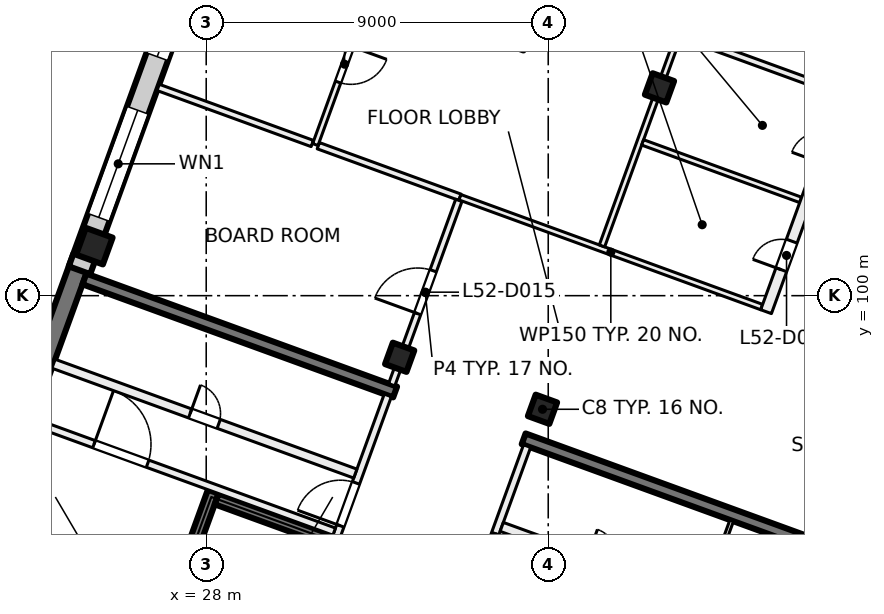
"""IFC4 building model, lengths in metres.
Left out: names, types, materials, properties, quantities, classifications, styles, units other than length and angle.
Written with IfcOpenShell. Run it as: python <this file> out.ifc"""

import sys

from ifc_helpers import new_model, si_unit, direction, frame, frame_2d, origin, origin_2d, place, context, subcontext, project, spatial, rectangle, extrude, element, fill, save


model = new_model("IFC4")
c1 = context("Model", 3, precision=1e-05, world=origin(), true_north=direction((0.0, 1.0)))
c2 = subcontext(c1, "Body", "Model", "MODEL_VIEW")
j1 = project(units=[si_unit("LENGTHUNIT", "METRE"), si_unit("PLANEANGLEUNIT", "RADIAN")], contexts=[c1])
p1 = place(None, origin())
s1 = spatial("IfcSite", under=j1, at=p1, CompositionType="ELEMENT")
p2 = place(p1, origin())
s2 = spatial("IfcBuilding", under=s1, at=p2, CompositionType="ELEMENT")
p3 = place(p2, frame((0.0, 0.0, 220.0)))
s3 = spatial("IfcBuildingStorey", under=s2, at=p3, CompositionType="ELEMENT", Elevation=220.0)
for number, where, z_axis, x_axis in (
    (1, (39.927, 105.468, 0.0), (0.0, 0.0, 1.0), (-0.342, -0.94, 0.0)),
    (2, (36.849, 97.011, 0.0), (0.0, 0.0, 1.0), (-0.342, -0.94, 0.0)),
    (3, (33.091, 98.379, 0.0), (0.0, 0.0, 1.0), (-0.342, -0.94, 0.0)),
):
    element("IfcColumn", number, at=place(p3, frame(where, z_axis=z_axis, x_axis=x_axis)), inside=s3, PredefinedType="COLUMN", context=c2, shape_type="SweptSolid", body=[
        extrude(rectangle(XDim=0.6, YDim=0.6, at=origin_2d()), origin(), (0.0, 0.0, 1.0), 4.0),
    ])
p4 = place(p3, frame((25.056, 101.303, 0.0), z_axis=(0.0, 0.0, 1.0), x_axis=(-0.342020143326, -0.939692620786, 0.0)))
e4 = element("IfcColumn", 4, at=p4, inside=s3, PredefinedType="COLUMN", context=c2, shape_type="SweptSolid", body=[
    extrude(rectangle(XDim=0.75, YDim=0.75, at=origin_2d()), origin(), (0.0, 0.0, 1.0), 4.0),
])
p5 = place(p3, frame((41.874, 85.232, 0.0), z_axis=(0.0, 0.0, 1.0), x_axis=(0.342020437038, 0.939692513883, 0.0)))
e5 = element("IfcWall", 5, at=p5, inside=s3, PredefinedType="SHEAR", context=c2, shape_type="SweptSolid", body=[
    extrude(rectangle(XDim=8.975, YDim=0.5, at=frame_2d((4.487, 0.0))), origin(), (0.0, 0.0, 1.0), 4.0),
])
p6 = place(p3, frame((21.67, 92.585, 0.0), z_axis=(0.0, 0.0, 1.0), x_axis=(0.342035714298, 0.93968695327, 0.0)))
e6 = element("IfcWall", 6, at=p6, inside=s3, PredefinedType="SHEAR", context=c2, shape_type="SweptSolid", body=[
    extrude(rectangle(XDim=8.975, YDim=0.5, at=frame_2d((4.488, 0.0))), origin(), (0.0, 0.0, 1.0), 4.0),
])
p7 = place(p3, frame((27.191, 82.169, 0.0), z_axis=(0.0, 0.0, 1.0), x_axis=(0.342016684409, 0.939693879721, 0.0)))
e7 = element("IfcWall", 7, at=p7, inside=s3, PredefinedType="SHEAR", context=c2, shape_type="SweptSolid", body=[
    extrude(rectangle(XDim=12.25, YDim=0.3, at=frame_2d((6.125, 0.0))), origin(), (0.0, 0.0, 1.0), 4.0),
])
p8 = place(p7, frame((0.75, 0.0, 0.0)))
e8 = element("IfcOpeningElement", 8, at=p8, cuts=e7, PredefinedType="OPENING", context=c2, shape_type="SweptSolid", body=[
    extrude(rectangle(XDim=1.1, YDim=2.1, at=frame_2d((0.55, 1.05))), frame((0.0, 0.16, 0.0), z_axis=(0.0, -1.0, 0.0), x_axis=(1.0, 0.0, 0.0)), (0.0, 0.0, 1.0), 0.32),
])
p9 = place(p7, frame((3.15, 0.0, 0.0)))
e9 = element("IfcOpeningElement", 9, at=p9, cuts=e7, PredefinedType="OPENING", context=c2, shape_type="SweptSolid", body=[
    extrude(rectangle(XDim=1.1, YDim=2.1, at=frame_2d((0.55, 1.05))), frame((0.0, 0.16, 0.0), z_axis=(0.0, -1.0, 0.0), x_axis=(1.0, 0.0, 0.0)), (0.0, 0.0, 1.0), 0.32),
])
p10 = place(p7, frame((5.55, 0.0, 0.0)))
e10 = element("IfcOpeningElement", 10, at=p10, cuts=e7, PredefinedType="OPENING", context=c2, shape_type="SweptSolid", body=[
    extrude(rectangle(XDim=1.1, YDim=2.1, at=frame_2d((0.55, 1.05))), frame((0.0, 0.16, 0.0), z_axis=(0.0, -1.0, 0.0), x_axis=(1.0, 0.0, 0.0)), (0.0, 0.0, 1.0), 0.32),
])
p11 = place(p7, frame((10.35, 0.0, 0.0)))
e11 = element("IfcOpeningElement", 11, at=p11, cuts=e7, PredefinedType="OPENING", context=c2, shape_type="SweptSolid", body=[
    extrude(rectangle(XDim=1.1, YDim=2.1, at=frame_2d((0.55, 1.05))), frame((0.0, 0.16, 0.0), z_axis=(0.0, -1.0, 0.0), x_axis=(1.0, 0.0, 0.0)), (0.0, 0.0, 1.0), 0.32),
])
p12 = place(p3, frame((23.996, 83.332, 0.0), z_axis=(0.0, 0.0, 1.0), x_axis=(0.342016684409, 0.939693879721, 0.0)))
e12 = element("IfcWall", 12, at=p12, inside=s3, PredefinedType="SHEAR", context=c2, shape_type="SweptSolid", body=[
    extrude(rectangle(XDim=12.25, YDim=0.3, at=frame_2d((6.125, 0.0))), origin(), (0.0, 0.0, 1.0), 4.0),
])
p13 = place(p12, frame((8.0, 0.0, 0.0)))
e13 = element("IfcOpeningElement", 13, at=p13, cuts=e12, PredefinedType="OPENING", context=c2, shape_type="SweptSolid", body=[
    extrude(rectangle(XDim=1.1, YDim=2.1, at=frame_2d((0.55, 1.05))), frame((0.0, 0.16, 0.0), z_axis=(0.0, -1.0, 0.0), x_axis=(1.0, 0.0, 0.0)), (0.0, 0.0, 1.0), 0.32),
])
p14 = place(p3, frame((31.188, 93.591, 0.0), z_axis=(0.0, 0.0, 1.0), x_axis=(-0.939680694448, 0.342052908892, 0.0)))
e14 = element("IfcWall", 14, at=p14, inside=s3, PredefinedType="SHEAR", context=c2, shape_type="SweptSolid", body=[
    extrude(rectangle(XDim=3.1, YDim=0.3, at=frame_2d((1.55, 0.0))), origin(), (0.0, 0.0, 1.0), 4.0),
])
p15 = place(p3, frame((44.529, 93.258, 0.0), z_axis=(0.0, 0.0, 1.0), x_axis=(-0.9396917844, 0.342022441267, 0.0)))
e15 = element("IfcWall", 15, at=p15, inside=s3, PredefinedType="SHEAR", context=c2, shape_type="SweptSolid", body=[
    extrude(rectangle(XDim=8.7, YDim=0.3, at=frame_2d((4.35, 0.0))), origin(), (0.0, 0.0, 1.0), 4.0),
])
p16 = place(p3, frame((32.971, 97.465, 0.0), z_axis=(0.0, 0.0, 1.0), x_axis=(-0.939695066972, 0.34201342241, 0.0)))
e16 = element("IfcWall", 16, at=p16, inside=s3, PredefinedType="SHEAR", context=c2, shape_type="SweptSolid", body=[
    extrude(rectangle(XDim=8.7, YDim=0.3, at=frame_2d((4.35, 0.0))), origin(), (0.0, 0.0, 1.0), 4.0),
])
p17 = place(p3, frame((24.666, 100.669, 0.0), z_axis=(0.0, 0.0, 1.0), x_axis=(0.34201964167, 0.939692803373, 0.0)))
e17 = element("IfcWall", 17, at=p17, inside=s3, PredefinedType="SOLIDWALL", context=c2, shape_type="SweptSolid", body=[
    extrude(rectangle(XDim=32.884, YDim=0.6, at=frame_2d((16.442, 0.0))), origin(), (0.0, 0.0, 1.0), 3.625),
])
p18 = place(p17, frame((1.48, 0.0, 0.9)))
e18 = element("IfcOpeningElement", 18, at=p18, cuts=e17, PredefinedType="OPENING", context=c2, shape_type="SweptSolid", body=[
    extrude(rectangle(XDim=3.0, YDim=2.4, at=frame_2d((1.5, 1.2))), frame((0.0, 0.31, 0.0), z_axis=(0.0, -1.0, 0.0), x_axis=(1.0, 0.0, 0.0)), (0.0, 0.0, 1.0), 0.62),
])
p19 = place(p17, frame((5.98, 0.0, 0.9)))
e19 = element("IfcOpeningElement", 19, at=p19, cuts=e17, PredefinedType="OPENING", context=c2, shape_type="SweptSolid", body=[
    extrude(rectangle(XDim=3.0, YDim=2.4, at=frame_2d((1.5, 1.2))), frame((0.0, 0.31, 0.0), z_axis=(0.0, -1.0, 0.0), x_axis=(1.0, 0.0, 0.0)), (0.0, 0.0, 1.0), 0.62),
])
p20 = place(p17, frame((10.48, 0.0, 0.9)))
e20 = element("IfcOpeningElement", 20, at=p20, cuts=e17, PredefinedType="OPENING", context=c2, shape_type="SweptSolid", body=[
    extrude(rectangle(XDim=3.0, YDim=2.4, at=frame_2d((1.5, 1.2))), frame((0.0, 0.31, 0.0), z_axis=(0.0, -1.0, 0.0), x_axis=(1.0, 0.0, 0.0)), (0.0, 0.0, 1.0), 0.62),
])
p21 = place(p17, frame((14.98, 0.0, 0.9)))
e21 = element("IfcOpeningElement", 21, at=p21, cuts=e17, PredefinedType="OPENING", context=c2, shape_type="SweptSolid", body=[
    extrude(rectangle(XDim=3.0, YDim=2.4, at=frame_2d((1.5, 1.2))), frame((0.0, 0.31, 0.0), z_axis=(0.0, -1.0, 0.0), x_axis=(1.0, 0.0, 0.0)), (0.0, 0.0, 1.0), 0.62),
])
p22 = place(p17, frame((19.48, 0.0, 0.9)))
e22 = element("IfcOpeningElement", 22, at=p22, cuts=e17, PredefinedType="OPENING", context=c2, shape_type="SweptSolid", body=[
    extrude(rectangle(XDim=3.0, YDim=2.4, at=frame_2d((1.5, 1.2))), frame((0.0, 0.31, 0.0), z_axis=(0.0, -1.0, 0.0), x_axis=(1.0, 0.0, 0.0)), (0.0, 0.0, 1.0), 0.62),
])
p23 = place(p17, frame((23.98, 0.0, 0.9)))
e23 = element("IfcOpeningElement", 23, at=p23, cuts=e17, PredefinedType="OPENING", context=c2, shape_type="SweptSolid", body=[
    extrude(rectangle(XDim=3.0, YDim=2.4, at=frame_2d((1.5, 1.2))), frame((0.0, 0.31, 0.0), z_axis=(0.0, -1.0, 0.0), x_axis=(1.0, 0.0, 0.0)), (0.0, 0.0, 1.0), 0.62),
])
p24 = place(p17, frame((28.48, 0.0, 0.9)))
e24 = element("IfcOpeningElement", 24, at=p24, cuts=e17, PredefinedType="OPENING", context=c2, shape_type="SweptSolid", body=[
    extrude(rectangle(XDim=3.0, YDim=2.4, at=frame_2d((1.5, 1.2))), frame((0.0, 0.31, 0.0), z_axis=(0.0, -1.0, 0.0), x_axis=(1.0, 0.0, 0.0)), (0.0, 0.0, 1.0), 0.62),
])
p25 = place(p3, frame((31.427, 93.663, 0.0), z_axis=(0.0, 0.0, 1.0), x_axis=(0.342030870568, 0.93968871632, 0.0)))
e25 = element("IfcWall", 25, at=p25, inside=s3, PredefinedType="PARTITIONING", context=c2, shape_type="SweptSolid", body=[
    extrude(rectangle(XDim=3.95, YDim=0.2, at=frame_2d((1.975, 0.0))), origin(), (0.0, 0.0, 1.0), 3.625),
])
p26 = place(p25, frame((0.3, 0.0, 0.0)))
e26 = element("IfcOpeningElement", 26, at=p26, cuts=e25, PredefinedType="OPENING", context=c2, shape_type="SweptSolid", body=[
    extrude(rectangle(XDim=1.2, YDim=2.1, at=frame_2d((0.6, 1.05))), frame((0.0, 0.11, 0.0), z_axis=(0.0, -1.0, 0.0), x_axis=(1.0, 0.0, 0.0)), (0.0, 0.0, 1.0), 0.22),
])
p27 = place(p3, frame((23.427, 96.682, 0.0), z_axis=(0.0, 0.0, 1.0), x_axis=(0.939690465531, -0.342026064782, 0.0)))
e27 = element("IfcWall", 27, at=p27, inside=s3, PredefinedType="PARTITIONING", context=c2, shape_type="SweptSolid", body=[
    extrude(rectangle(XDim=8.45, YDim=0.2, at=frame_2d((4.225, 0.0))), origin(), (0.0, 0.0, 1.0), 3.625),
])
p28 = place(p27, frame((1.725, 0.0, 0.0)))
e28 = element("IfcOpeningElement", 28, at=p28, cuts=e27, PredefinedType="OPENING", context=c2, shape_type="SweptSolid", body=[
    extrude(rectangle(XDim=1.5, YDim=2.1, at=frame_2d((0.75, 1.05))), frame((0.0, 0.11, 0.0), z_axis=(0.0, -1.0, 0.0), x_axis=(1.0, 0.0, 0.0)), (0.0, 0.0, 1.0), 0.22),
])
p29 = place(p3, frame((23.983, 98.208, 0.0), z_axis=(0.0, 0.0, 1.0), x_axis=(0.939699751196, -0.342000552051, 0.0)))
e29 = element("IfcWall", 29, at=p29, inside=s3, PredefinedType="PARTITIONING", context=c2, shape_type="SweptSolid", body=[
    extrude(rectangle(XDim=8.45, YDim=0.25, at=frame_2d((4.225, 0.0))), origin(), (0.0, 0.0, 1.0), 3.625),
])
p30 = place(p29, frame((3.825, 0.0, 0.0)))
e30 = element("IfcOpeningElement", 30, at=p30, cuts=e29, PredefinedType="OPENING", context=c2, shape_type="SweptSolid", body=[
    extrude(rectangle(XDim=0.8, YDim=2.1, at=frame_2d((0.4, 1.05))), frame((0.0, 0.135, 0.0), z_axis=(0.0, -1.0, 0.0), x_axis=(1.0, 0.0, 0.0)), (0.0, 0.0, 1.0), 0.27),
])
p31 = place(p3, frame((36.443, 96.041, 0.0), z_axis=(0.0, 0.0, 1.0), x_axis=(-0.341996156931, -0.939701350773, 0.0)))
e31 = element("IfcWall", 31, at=p31, inside=s3, PredefinedType="PARTITIONING", context=c2, shape_type="SweptSolid", body=[
    extrude(rectangle(XDim=3.95, YDim=0.2, at=frame_2d((1.975, 0.0))), origin(), (0.0, 0.0, 1.0), 3.625),
])
p32 = place(p31, frame((2.45, 0.0, 0.0)))
e32 = element("IfcOpeningElement", 32, at=p32, cuts=e31, PredefinedType="OPENING", context=c2, shape_type="SweptSolid", body=[
    extrude(rectangle(XDim=1.2, YDim=2.1, at=frame_2d((0.6, 1.05))), frame((0.0, 0.11, 0.0), z_axis=(0.0, -1.0, 0.0), x_axis=(1.0, 0.0, 0.0)), (0.0, 0.0, 1.0), 0.22),
])
p33 = place(p3, frame((35.776, 93.916, 0.0), z_axis=(0.0, 0.0, 1.0), x_axis=(0.939690465531, -0.342026064782, 0.0)))
e33 = element("IfcWall", 33, at=p33, inside=s3, PredefinedType="PARTITIONING", context=c2, shape_type="SweptSolid", body=[
    extrude(rectangle(XDim=8.45, YDim=0.25, at=frame_2d((4.225, 0.0))), origin(), (0.0, 0.0, 1.0), 3.625),
])
p34 = place(p33, frame((2.39, 0.0, 0.0)))
e34 = element("IfcOpeningElement", 34, at=p34, cuts=e33, PredefinedType="OPENING", context=c2, shape_type="SweptSolid", body=[
    extrude(rectangle(XDim=0.8, YDim=2.1, at=frame_2d((0.4, 1.05))), frame((0.0, 0.135, 0.0), z_axis=(0.0, -1.0, 0.0), x_axis=(1.0, 0.0, 0.0)), (0.0, 0.0, 1.0), 0.27),
])
p35 = place(p33, frame((6.665, 0.0, 0.0)))
e35 = element("IfcOpeningElement", 35, at=p35, cuts=e33, PredefinedType="OPENING", context=c2, shape_type="SweptSolid", body=[
    extrude(rectangle(XDim=0.8, YDim=2.1, at=frame_2d((0.4, 1.05))), frame((0.0, 0.135, 0.0), z_axis=(0.0, -1.0, 0.0), x_axis=(1.0, 0.0, 0.0)), (0.0, 0.0, 1.0), 0.27),
])
p36 = place(p3, frame((41.828, 94.082, 0.0), z_axis=(0.0, 0.0, 1.0), x_axis=(-0.342023078919, -0.939691552312, 0.0)))
e36 = element("IfcWall", 36, at=p36, inside=s3, PredefinedType="PARTITIONING", context=c2, shape_type="SweptSolid", body=[
    extrude(rectangle(XDim=2.1, YDim=0.1, at=frame_2d((1.05, 0.0))), origin(), (0.0, 0.0, 1.0), 3.625),
])
p37 = place(p3, frame((26.736, 105.48, 0.0), z_axis=(0.0, 0.0, 1.0), x_axis=(0.939677739056, -0.342061027776, 0.0)))
e37 = element("IfcWall", 37, at=p37, inside=s3, PredefinedType="PARTITIONING", context=c2, shape_type="SweptSolid", body=[
    extrude(rectangle(XDim=4.315, YDim=0.175, at=frame_2d((2.158, 0.0))), origin(), (0.0, 0.0, 1.0), 3.625),
])
p38 = place(p3, frame((30.95, 103.946, 0.0), z_axis=(0.0, 0.0, 1.0), x_axis=(0.939739492658, -0.341891336449, 0.0)))
e38 = element("IfcWall", 38, at=p38, inside=s3, PredefinedType="PARTITIONING", context=c2, shape_type="SweptSolid", body=[
    extrude(rectangle(XDim=3.966, YDim=0.175, at=frame_2d((1.983, 0.0))), origin(), (0.0, 0.0, 1.0), 3.625),
])
p39 = place(p3, frame((32.436, 108.274, 0.0), z_axis=(0.0, 0.0, 1.0), x_axis=(-0.342145890874, -0.939646842893, 0.0)))
e39 = element("IfcWall", 39, at=p39, inside=s3, PredefinedType="PARTITIONING", context=c2, shape_type="SweptSolid", body=[
    extrude(rectangle(XDim=4.574, YDim=0.15, at=frame_2d((2.287, 0.0))), origin(), (0.0, 0.0, 1.0), 3.625),
])
p40 = place(p39, frame((1.824, 0.0, 0.0)))
e40 = element("IfcOpeningElement", 40, at=p40, cuts=e39, PredefinedType="OPENING", context=c2, shape_type="SweptSolid", body=[
    extrude(rectangle(XDim=1.0, YDim=2.1, at=frame_2d((0.5, 1.05))), frame((0.0, 0.085, 0.0), z_axis=(0.0, -1.0, 0.0), x_axis=(1.0, 0.0, 0.0)), (0.0, 0.0, 1.0), 0.17),
])
p41 = place(p3, frame((32.881, 97.657, 0.0), z_axis=(0.0, 0.0, 1.0), x_axis=(0.342058204353, 0.939678766832, 0.0)))
e41 = element("IfcWall", 41, at=p41, inside=s3, PredefinedType="PARTITIONING", context=c2, shape_type="SweptSolid", body=[
    extrude(rectangle(XDim=5.163, YDim=0.175, at=frame_2d((2.581, 0.0))), origin(), (0.0, 0.0, 1.0), 3.625),
])
p42 = place(p41, frame((1.991, 0.0, 0.0)))
e42 = element("IfcOpeningElement", 42, at=p42, cuts=e41, PredefinedType="OPENING", context=c2, shape_type="SweptSolid", body=[
    extrude(rectangle(XDim=1.2, YDim=2.1, at=frame_2d((0.6, 1.05))), frame((0.0, 0.097, 0.0), z_axis=(0.0, -1.0, 0.0), x_axis=(1.0, 0.0, 0.0)), (0.0, 0.0, 1.0), 0.195),
])
p43 = place(p3, frame((34.677, 102.59, 0.0), z_axis=(0.0, 0.0, 1.0), x_axis=(0.939683705252, -0.342044637561, 0.0)))
e43 = element("IfcWall", 43, at=p43, inside=s3, PredefinedType="PARTITIONING", context=c2, shape_type="SweptSolid", body=[
    extrude(rectangle(XDim=8.45, YDim=0.15, at=frame_2d((4.225, 0.0))), origin(), (0.0, 0.0, 1.0), 3.625),
])
p44 = place(p3, frame((38.414, 101.309, 0.0), z_axis=(0.0, 0.0, 1.0), x_axis=(0.34186876189, 0.939747705315, 0.0)))
e44 = element("IfcWall", 44, at=p44, inside=s3, PredefinedType="PARTITIONING", context=c2, shape_type="SweptSolid", body=[
    extrude(rectangle(XDim=5.926, YDim=0.15, at=frame_2d((2.963, 0.0))), origin(), (0.0, 0.0, 1.0), 3.625),
])
p45 = place(p3, frame((39.484, 104.033, 0.0), z_axis=(0.0, 0.0, 1.0), x_axis=(0.939685474739, -0.342039776289, 0.0)))
e45 = element("IfcWall", 45, at=p45, inside=s3, PredefinedType="PARTITIONING", context=c2, shape_type="SweptSolid", body=[
    extrude(rectangle(XDim=4.426, YDim=0.15, at=frame_2d((2.213, 0.0))), origin(), (0.0, 0.0, 1.0), 3.625),
])
p46 = place(p3, frame((40.522, 106.848, 0.0), z_axis=(0.0, 0.0, 1.0), x_axis=(0.939646357962, -0.342147222654, 0.0)))
e46 = element("IfcWall", 46, at=p46, inside=s3, PredefinedType="PARTITIONING", context=c2, shape_type="SweptSolid", body=[
    extrude(rectangle(XDim=4.413, YDim=0.175, at=frame_2d((2.207, 0.0))), origin(), (0.0, 0.0, 1.0), 3.625),
])
p47 = place(p3, frame((42.732, 99.579, 0.0), z_axis=(0.0, 0.0, 1.0), x_axis=(0.342036000593, 0.939686849061, 0.0)))
e47 = element("IfcWall", 47, at=p47, inside=s3, PredefinedType="PARTITIONING", context=c2, shape_type="SweptSolid", body=[
    extrude(rectangle(XDim=23.018, YDim=0.3, at=frame_2d((11.509, 0.0))), origin(), (0.0, 0.0, 1.0), 3.625),
])
p48 = place(p47, frame((1.175, 0.0, 0.0)))
e48 = element("IfcOpeningElement", 48, at=p48, cuts=e47, PredefinedType="OPENING", context=c2, shape_type="SweptSolid", body=[
    extrude(rectangle(XDim=0.8, YDim=2.1, at=frame_2d((0.4, 1.05))), frame((0.0, 0.16, 0.0), z_axis=(0.0, -1.0, 0.0), x_axis=(1.0, 0.0, 0.0)), (0.0, 0.0, 1.0), 0.32),
])
p49 = place(p47, frame((4.175, 0.0, 0.0)))
e49 = element("IfcOpeningElement", 49, at=p49, cuts=e47, PredefinedType="OPENING", context=c2, shape_type="SweptSolid", body=[
    extrude(rectangle(XDim=0.8, YDim=2.1, at=frame_2d((0.4, 1.05))), frame((0.0, 0.16, 0.0), z_axis=(0.0, -1.0, 0.0), x_axis=(1.0, 0.0, 0.0)), (0.0, 0.0, 1.0), 0.32),
])
p50 = place(p47, frame((7.725, 0.0, 0.0)))
e50 = element("IfcOpeningElement", 50, at=p50, cuts=e47, PredefinedType="OPENING", context=c2, shape_type="SweptSolid", body=[
    extrude(rectangle(XDim=1.2, YDim=2.1, at=frame_2d((0.6, 1.05))), frame((0.0, 0.16, 0.0), z_axis=(0.0, -1.0, 0.0), x_axis=(1.0, 0.0, 0.0)), (0.0, 0.0, 1.0), 0.32),
])
p51 = place(p47, frame((15.675, 0.0, 0.0)))
e51 = element("IfcOpeningElement", 51, at=p51, cuts=e47, PredefinedType="OPENING", context=c2, shape_type="SweptSolid", body=[
    extrude(rectangle(XDim=1.8, YDim=2.1, at=frame_2d((0.9, 1.05))), frame((0.0, 0.16, 0.0), z_axis=(0.0, -1.0, 0.0), x_axis=(1.0, 0.0, 0.0)), (0.0, 0.0, 1.0), 0.32),
])
p52 = place(p18, origin())
e52 = element("IfcWindow", 52, at=p52, inside=s3, PartitioningType="SINGLE_PANEL", PredefinedType="WINDOW", context=c2, shape_type="SweptSolid", body=[
    extrude(rectangle(XDim=3.0, YDim=2.4, at=frame_2d((1.5, 1.2))), frame((0.0, 0.03, 0.0), z_axis=(0.0, -1.0, 0.0), x_axis=(1.0, 0.0, 0.0)), (0.0, 0.0, 1.0), 0.06),
])
fill(e18, e52)
p53 = place(p19, origin())
e53 = element("IfcWindow", 53, at=p53, inside=s3, PartitioningType="SINGLE_PANEL", PredefinedType="WINDOW", context=c2, shape_type="SweptSolid", body=[
    extrude(rectangle(XDim=3.0, YDim=2.4, at=frame_2d((1.5, 1.2))), frame((0.0, 0.03, 0.0), z_axis=(0.0, -1.0, 0.0), x_axis=(1.0, 0.0, 0.0)), (0.0, 0.0, 1.0), 0.06),
])
fill(e19, e53)
p54 = place(p26, origin())
e54 = element("IfcDoor", 54, at=p54, inside=s3, OperationType="DOUBLE_DOOR_SINGLE_SWING", PredefinedType="DOOR", context=c2, shape_type="SweptSolid", body=[
    extrude(rectangle(XDim=1.2, YDim=2.1, at=frame_2d((0.6, 1.05))), frame((0.0, 0.025, 0.0), z_axis=(0.0, -1.0, 0.0), x_axis=(1.0, 0.0, 0.0)), (0.0, 0.0, 1.0), 0.05),
])
fill(e26, e54)
p55 = place(p28, origin())
e55 = element("IfcDoor", 55, at=p55, inside=s3, OperationType="DOUBLE_DOOR_SINGLE_SWING", PredefinedType="DOOR", context=c2, shape_type="SweptSolid", body=[
    extrude(rectangle(XDim=1.5, YDim=2.1, at=frame_2d((0.75, 1.05))), frame((0.0, 0.025, 0.0), z_axis=(0.0, -1.0, 0.0), x_axis=(1.0, 0.0, 0.0)), (0.0, 0.0, 1.0), 0.05),
])
fill(e28, e55)
p56 = place(p30, origin())
e56 = element("IfcDoor", 56, at=p56, inside=s3, OperationType="SINGLE_SWING_LEFT", PredefinedType="DOOR", context=c2, shape_type="SweptSolid", body=[
    extrude(rectangle(XDim=0.8, YDim=2.1, at=frame_2d((0.4, 1.05))), frame((0.0, 0.025, 0.0), z_axis=(0.0, -1.0, 0.0), x_axis=(1.0, 0.0, 0.0)), (0.0, 0.0, 1.0), 0.05),
])
fill(e30, e56)
p57 = place(p32, origin())
e57 = element("IfcDoor", 57, at=p57, inside=s3, OperationType="DOUBLE_DOOR_SINGLE_SWING", PredefinedType="DOOR", context=c2, shape_type="SweptSolid", body=[
    extrude(rectangle(XDim=1.2, YDim=2.1, at=frame_2d((0.6, 1.05))), frame((0.0, 0.025, 0.0), z_axis=(0.0, -1.0, 0.0), x_axis=(1.0, 0.0, 0.0)), (0.0, 0.0, 1.0), 0.05),
])
fill(e32, e57)
p58 = place(p42, origin())
e58 = element("IfcDoor", 58, at=p58, inside=s3, OperationType="DOUBLE_DOOR_SINGLE_SWING", PredefinedType="DOOR", context=c2, shape_type="SweptSolid", body=[
    extrude(rectangle(XDim=1.2, YDim=2.1, at=frame_2d((0.6, 1.05))), frame((0.0, 0.025, 0.0), z_axis=(0.0, -1.0, 0.0), x_axis=(1.0, 0.0, 0.0)), (0.0, 0.0, 1.0), 0.05),
])
fill(e42, e58)
p59 = place(p48, origin())
e59 = element("IfcDoor", 59, at=p59, inside=s3, OperationType="SINGLE_SWING_RIGHT", PredefinedType="DOOR", context=c2, shape_type="SweptSolid", body=[
    extrude(rectangle(XDim=0.8, YDim=2.1, at=frame_2d((0.4, 1.05))), frame((0.0, 0.025, 0.0), z_axis=(0.0, -1.0, 0.0), x_axis=(1.0, 0.0, 0.0)), (0.0, 0.0, 1.0), 0.05),
])
fill(e48, e59)
p60 = place(p40, origin())
e60 = element("IfcDoor", 60, at=p60, inside=s3, OperationType="SINGLE_SWING_LEFT", PredefinedType="DOOR", context=c2, shape_type="SweptSolid", body=[
    extrude(rectangle(XDim=1.0, YDim=2.1, at=frame_2d((0.5, 1.05))), frame((0.0, 0.025, 0.0), z_axis=(0.0, -1.0, 0.0), x_axis=(1.0, 0.0, 0.0)), (0.0, 0.0, 1.0), 0.05),
])
fill(e40, e60)
save(model, sys.argv[1])
